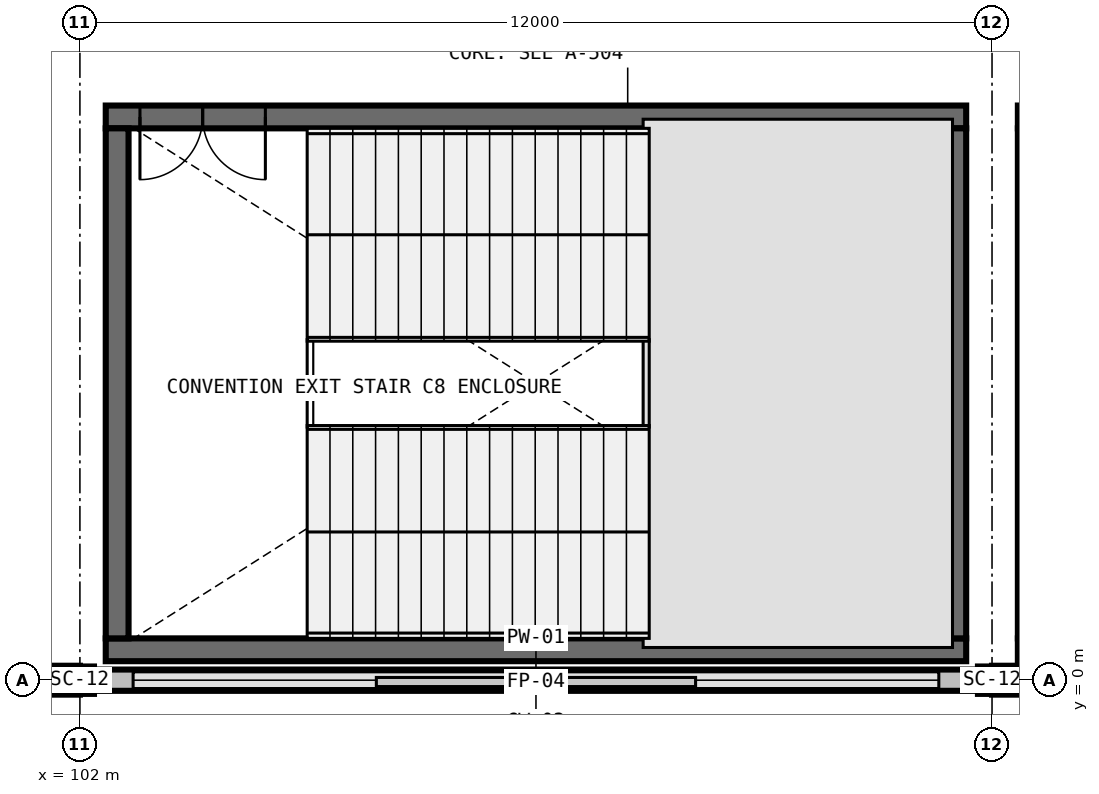
"""IFC4 building model, lengths in metres.
Left out: names, types, materials, properties, quantities, classifications, styles, units other than length and angle.
Written with IfcOpenShell. Run it as: python <this file> out.ifc"""

import sys

from ifc_helpers import new_model, si_unit, direction, frame, frame_2d, origin, origin_2d, place, context, subcontext, project, spatial, rectangle, i_section, extrude, element, fill, save


model = new_model("IFC4")
c1 = context("Model", 3, precision=1e-05, world=origin(), true_north=direction((0.0, 1.0)))
c2 = subcontext(c1, "Body", "Model", "MODEL_VIEW")
j1 = project(units=[si_unit("LENGTHUNIT", "METRE"), si_unit("PLANEANGLEUNIT", "RADIAN")], contexts=[c1])
p1 = place(None, origin())
s1 = spatial("IfcSite", under=j1, at=p1, CompositionType="ELEMENT")
p2 = place(p1, origin())
s2 = spatial("IfcBuilding", under=s1, at=p2, CompositionType="ELEMENT")
p3 = place(p2, frame((0.0, 0.0, 18.0)))
s3 = spatial("IfcBuildingStorey", under=s2, at=p3, CompositionType="ELEMENT", Elevation=18.0)
for number, where, z_axis, x_axis in (
    (1, (102.0, 0.0, 0.0), (0.0, 0.0, 1.0), (1.0, 0.0, 0.0)),
    (2, (114.0, 0.0, 0.0), (0.0, 0.0, 1.0), (1.0, 0.0, 0.0)),
):
    element("IfcColumn", number, at=place(p3, frame(where, z_axis=z_axis, x_axis=x_axis)), inside=s3, PredefinedType="COLUMN", context=c2, shape_type="SweptSolid", body=[
        extrude(i_section(OverallWidth=0.37, OverallDepth=0.36, WebThickness=0.012, FlangeThickness=0.02, FilletRadius=0.031, at=origin_2d()), origin(), (0.0, 0.0, 1.0), 5.4),
    ])
p4 = place(p3, frame((113.66, 0.4, 0.0), z_axis=(0.0, 0.0, 1.0), x_axis=(-1.0, 0.0, 0.0)))
e3 = element("IfcWall", 3, at=p4, inside=s3, PredefinedType="SHEAR", context=c2, shape_type="SweptSolid", body=[
    extrude(rectangle(XDim=11.32, YDim=0.3, at=frame_2d((5.66, 0.0))), origin(), (0.0, 0.0, 1.0), 5.4),
])
p5 = place(p3, frame((113.66, 7.41, 0.0), z_axis=(0.0, 0.0, 1.0), x_axis=(-1.0, 0.0, 0.0)))
e4 = element("IfcWall", 4, at=p5, inside=s3, PredefinedType="SHEAR", context=c2, shape_type="SweptSolid", body=[
    extrude(rectangle(XDim=11.32, YDim=0.3, at=frame_2d((5.66, 0.0))), origin(), (0.0, 0.0, 1.0), 5.4),
])
p6 = place(p5, frame((9.22, 0.0, 0.0)))
e5 = element("IfcOpeningElement", 5, at=p6, cuts=e4, PredefinedType="OPENING", context=c2, shape_type="SweptSolid", body=[
    extrude(rectangle(XDim=1.65, YDim=2.25, at=frame_2d((0.825, 1.125))), frame((0.0, 0.165, 0.0), z_axis=(0.0, -1.0, 0.0), x_axis=(1.0, 0.0, 0.0)), (0.0, 0.0, 1.0), 0.33),
])
for number, where, z_axis, x_axis in (
    (6, (102.49, 7.26, 0.0), (0.0, 0.0, 1.0), (0.0, -1.0, 0.0)),
    (7, (113.51, 0.55, 0.0), (0.0, 0.0, 1.0), (0.0, 1.0, 0.0)),
):
    element("IfcWall", number, at=place(p3, frame(where, z_axis=z_axis, x_axis=x_axis)), inside=s3, PredefinedType="SHEAR", context=c2, shape_type="SweptSolid", body=[
        extrude(rectangle(XDim=6.71, YDim=0.3, at=frame_2d((3.355, 0.0))), origin(), (0.0, 0.0, 1.0), 5.4),
    ])
p7 = place(p3, frame((125.66, 0.4, 0.0), z_axis=(0.0, 0.0, 1.0), x_axis=(-1.0, 0.0, 0.0)))
e8 = element("IfcWall", 8, at=p7, inside=s3, PredefinedType="SHEAR", context=c2, shape_type="SweptSolid", body=[
    extrude(rectangle(XDim=11.32, YDim=0.3, at=frame_2d((5.66, 0.0))), origin(), (0.0, 0.0, 1.0), 5.4),
])
p8 = place(p3, frame((125.66, 7.41, 0.0), z_axis=(0.0, 0.0, 1.0), x_axis=(-1.0, 0.0, 0.0)))
e9 = element("IfcWall", 9, at=p8, inside=s3, PredefinedType="SHEAR", context=c2, shape_type="SweptSolid", body=[
    extrude(rectangle(XDim=11.32, YDim=0.3, at=frame_2d((5.66, 0.0))), origin(), (0.0, 0.0, 1.0), 5.4),
])
p9 = place(p8, frame((9.22, 0.0, 0.0)))
e10 = element("IfcOpeningElement", 10, at=p9, cuts=e9, PredefinedType="OPENING", context=c2, shape_type="SweptSolid", body=[
    extrude(rectangle(XDim=1.65, YDim=2.25, at=frame_2d((0.825, 1.125))), frame((0.0, 0.165, 0.0), z_axis=(0.0, -1.0, 0.0), x_axis=(1.0, 0.0, 0.0)), (0.0, 0.0, 1.0), 0.33),
])
p10 = place(p3, frame((114.49, 7.26, 0.0), z_axis=(0.0, 0.0, 1.0), x_axis=(0.0, -1.0, 0.0)))
e11 = element("IfcWall", 11, at=p10, inside=s3, PredefinedType="SHEAR", context=c2, shape_type="SweptSolid", body=[
    extrude(rectangle(XDim=6.71, YDim=0.3, at=frame_2d((3.355, 0.0))), origin(), (0.0, 0.0, 1.0), 5.4),
])
p11 = place(p3, frame((96.0, 0.0, 0.0), z_axis=(0.0, 0.0, 1.0), x_axis=(1.0, 0.0, 0.0)))
e12 = element("IfcWall", 12, at=p11, inside=s3, PredefinedType="STANDARD", context=c2, shape_type="SweptSolid", body=[
    extrude(rectangle(XDim=6.0, YDim=0.38, at=frame_2d((3.0, 0.0))), origin(), (0.0, 0.0, 1.0), 4.176),
])
p12 = place(p3, frame((102.0, 0.0, 0.0), z_axis=(0.0, 0.0, 1.0), x_axis=(1.0, 0.0, 0.0)))
e13 = element("IfcWall", 13, at=p12, inside=s3, PredefinedType="PARAPET", context=c2, shape_type="SweptSolid", body=[
    extrude(rectangle(XDim=12.0, YDim=0.28, at=frame_2d((6.0, 0.0))), origin(), (0.0, 0.0, 1.0), 0.2),
])
p13 = place(p3, frame((114.0, 0.0, 0.0), z_axis=(0.0, 0.0, 1.0), x_axis=(1.0, 0.0, 0.0)))
e14 = element("IfcWall", 14, at=p13, inside=s3, PredefinedType="STANDARD", context=c2, shape_type="SweptSolid", body=[
    extrude(rectangle(XDim=12.0, YDim=0.38, at=frame_2d((6.0, 0.0))), origin(), (0.0, 0.0, 1.0), 4.176),
])
p14 = place(p13, frame((1.5, 0.0, 0.85)))
e15 = element("IfcOpeningElement", 15, at=p14, cuts=e14, PredefinedType="OPENING", context=c2, shape_type="SweptSolid", body=[
    extrude(rectangle(XDim=2.2, YDim=1.95, at=frame_2d((1.1, 0.975))), frame((0.0, 0.205, 0.0), z_axis=(0.0, -1.0, 0.0), x_axis=(1.0, 0.0, 0.0)), (0.0, 0.0, 1.0), 0.41),
])
p15 = place(p6, origin())
e16 = element("IfcDoor", 16, at=p15, inside=s3, OperationType="DOUBLE_DOOR_SINGLE_SWING", PredefinedType="DOOR", context=c2, shape_type="SweptSolid", body=[
    extrude(rectangle(XDim=1.65, YDim=2.25, at=frame_2d((0.825, 1.125))), frame((0.0, 0.025, 0.0), z_axis=(0.0, -1.0, 0.0), x_axis=(1.0, 0.0, 0.0)), (0.0, 0.0, 1.0), 0.05),
])
fill(e5, e16)
save(model, sys.argv[1])
